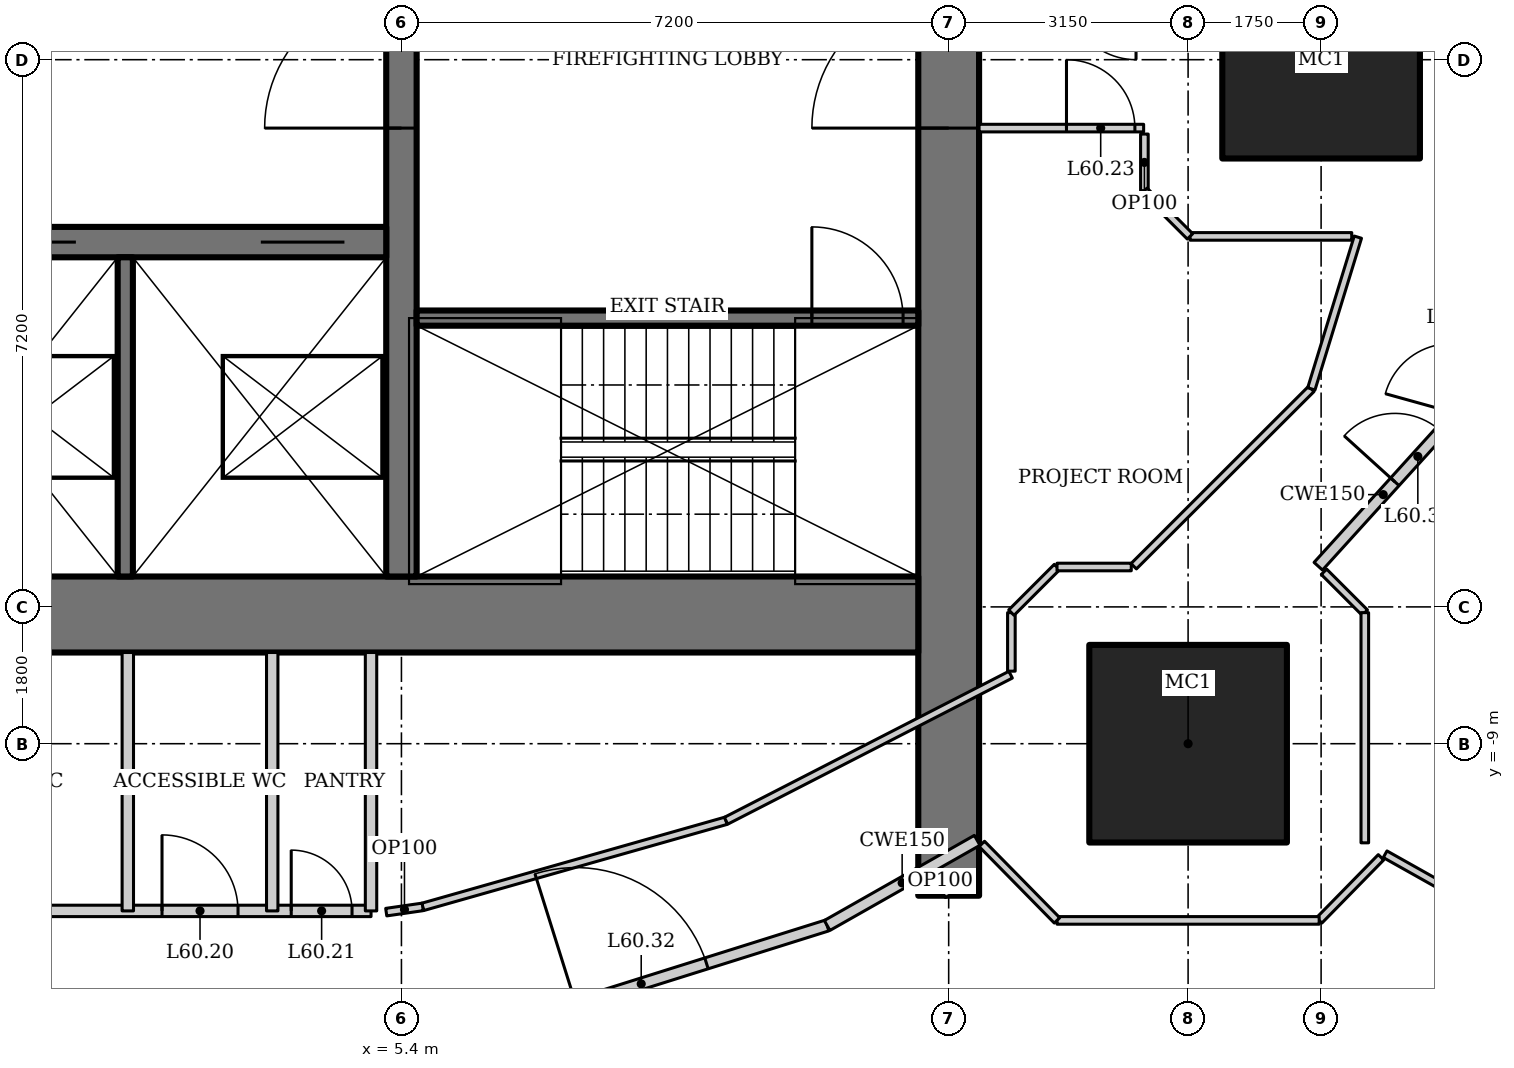
"""IFC4 building model, lengths in metres.
Left out: names, types, materials, properties, quantities, classifications, styles, units other than length and angle.
Written with IfcOpenShell. Run it as: python <this file> out.ifc"""

import sys

from ifc_helpers import new_model, si_unit, direction, frame, frame_2d, origin, origin_2d, place, context, subcontext, project, spatial, rectangle, hollow_rectangle, extrude, element, fill, save


model = new_model("IFC4")
c1 = context("Model", 3, precision=1e-05, world=origin(), true_north=direction((0.0, 1.0)))
c2 = subcontext(c1, "Body", "Model", "MODEL_VIEW")
j1 = project(units=[si_unit("LENGTHUNIT", "METRE"), si_unit("PLANEANGLEUNIT", "RADIAN")], contexts=[c1])
p1 = place(None, origin())
s1 = spatial("IfcSite", under=j1, at=p1, CompositionType="ELEMENT")
p2 = place(p1, origin())
s2 = spatial("IfcBuilding", under=s1, at=p2, CompositionType="ELEMENT")
p3 = place(p2, frame((0.0, 0.0, 257.8)))
s3 = spatial("IfcBuildingStorey", under=s2, at=p3, CompositionType="ELEMENT", Elevation=257.8)
for number, where, z_axis, x_axis in (
    (1, (17.5, 0.0, 0.0), (0.0, 0.0, 1.0), (1.0, 0.0, 0.0)),
    (2, (15.75, -9.0, 0.0), (0.0, 0.0, 1.0), (1.0, 0.0, 0.0)),
):
    element("IfcColumn", number, at=place(p3, frame(where, z_axis=z_axis, x_axis=x_axis)), inside=s3, PredefinedType="COLUMN", context=c2, shape_type="SweptSolid", body=[
        extrude(hollow_rectangle(XDim=2.6, YDim=2.6, WallThickness=0.13, at=origin_2d()), origin(), (0.0, 0.0, 1.0), 4.2),
    ])
p4 = place(p3, frame((12.6, -11.0, 0.0), z_axis=(0.0, 0.0, 1.0), x_axis=(0.0, 1.0, 0.0)))
e3 = element("IfcWall", 3, at=p4, inside=s3, PredefinedType="SHEAR", context=c2, shape_type="SweptSolid", body=[
    extrude(rectangle(XDim=22.0, YDim=0.8, at=frame_2d((11.0, 0.0))), origin(), (0.0, 0.0, 1.0), 4.2),
])
p5 = place(p4, frame((10.1, 0.0, 0.0)))
e4 = element("IfcOpeningElement", 4, at=p5, cuts=e3, PredefinedType="OPENING", context=c2, shape_type="SweptSolid", body=[
    extrude(rectangle(XDim=1.8, YDim=2.1, at=frame_2d((0.9, 1.05))), frame((0.0, 0.41, 0.0), z_axis=(0.0, -1.0, 0.0), x_axis=(1.0, 0.0, 0.0)), (0.0, 0.0, 1.0), 0.82),
])
p6 = place(p3, frame((-12.2, -7.3, 0.0), z_axis=(0.0, 0.0, 1.0), x_axis=(1.0, 0.0, 0.0)))
e5 = element("IfcWall", 5, at=p6, inside=s3, PredefinedType="SHEAR", context=c2, shape_type="SweptSolid", body=[
    extrude(rectangle(XDim=24.4, YDim=1.0, at=frame_2d((12.2, 0.0))), origin(), (0.0, 0.0, 1.0), 4.2),
])
p7 = place(p3, frame((5.4, -6.8, 0.0), z_axis=(0.0, 0.0, 1.0), x_axis=(0.0, 1.0, 0.0)))
e6 = element("IfcWall", 6, at=p7, inside=s3, PredefinedType="SHEAR", context=c2, shape_type="SweptSolid", body=[
    extrude(rectangle(XDim=14.6, YDim=0.4, at=frame_2d((7.3, 0.0))), origin(), (0.0, 0.0, 1.0), 4.2),
])
p8 = place(p7, frame((5.9, 0.0, 0.0)))
e7 = element("IfcOpeningElement", 7, at=p8, cuts=e6, PredefinedType="OPENING", context=c2, shape_type="SweptSolid", body=[
    extrude(rectangle(XDim=1.8, YDim=2.1, at=frame_2d((0.9, 1.05))), frame((0.0, 0.21, 0.0), z_axis=(0.0, -1.0, 0.0), x_axis=(1.0, 0.0, 0.0)), (0.0, 0.0, 1.0), 0.42),
])
p9 = place(p3, frame((-5.2, -2.4, 0.0), z_axis=(0.0, 0.0, 1.0), x_axis=(1.0, 0.0, 0.0)))
e8 = element("IfcWall", 8, at=p9, inside=s3, PredefinedType="SHEAR", context=c2, shape_type="SweptSolid", body=[
    extrude(rectangle(XDim=10.4, YDim=0.4, at=frame_2d((5.2, 0.0))), origin(), (0.0, 0.0, 1.0), 4.2),
])
p10 = place(p9, frame((1.683, 0.0, 0.0)))
e9 = element("IfcOpeningElement", 9, at=p10, cuts=e8, PredefinedType="OPENING", context=c2, shape_type="SweptSolid", body=[
    extrude(rectangle(XDim=1.1, YDim=2.2, at=frame_2d((0.55, 1.1))), frame((0.0, 0.21, 0.0), z_axis=(0.0, -1.0, 0.0), x_axis=(1.0, 0.0, 0.0)), (0.0, 0.0, 1.0), 0.42),
])
p11 = place(p9, frame((5.217, 0.0, 0.0)))
e10 = element("IfcOpeningElement", 10, at=p11, cuts=e8, PredefinedType="OPENING", context=c2, shape_type="SweptSolid", body=[
    extrude(rectangle(XDim=1.1, YDim=2.2, at=frame_2d((0.55, 1.1))), frame((0.0, 0.21, 0.0), z_axis=(0.0, -1.0, 0.0), x_axis=(1.0, 0.0, 0.0)), (0.0, 0.0, 1.0), 0.42),
])
p12 = place(p9, frame((8.75, 0.0, 0.0)))
e11 = element("IfcOpeningElement", 11, at=p12, cuts=e8, PredefinedType="OPENING", context=c2, shape_type="SweptSolid", body=[
    extrude(rectangle(XDim=1.1, YDim=2.2, at=frame_2d((0.55, 1.1))), frame((0.0, 0.21, 0.0), z_axis=(0.0, -1.0, 0.0), x_axis=(1.0, 0.0, 0.0)), (0.0, 0.0, 1.0), 0.42),
])
p13 = place(p3, frame((1.767, -2.6, 0.0), z_axis=(0.0, 0.0, 1.0), x_axis=(0.0, -1.0, 0.0)))
e12 = element("IfcWall", 12, at=p13, inside=s3, PredefinedType="SOLIDWALL", context=c2, shape_type="SweptSolid", body=[
    extrude(rectangle(XDim=4.2, YDim=0.2, at=frame_2d((2.1, 0.0))), origin(), (0.0, 0.0, 1.0), 4.2),
])
p14 = place(p3, frame((5.6, -3.4, 0.0), z_axis=(0.0, 0.0, 1.0), x_axis=(1.0, 0.0, 0.0)))
e13 = element("IfcWall", 13, at=p14, inside=s3, PredefinedType="SHEAR", context=c2, shape_type="SweptSolid", body=[
    extrude(rectangle(XDim=6.6, YDim=0.2, at=frame_2d((3.3, 0.0))), origin(), (0.0, 0.0, 1.0), 4.2),
])
p15 = place(p14, frame((5.2, 0.0, 0.0)))
e14 = element("IfcOpeningElement", 14, at=p15, cuts=e13, PredefinedType="OPENING", context=c2, shape_type="SweptSolid", body=[
    extrude(rectangle(XDim=1.2, YDim=2.1, at=frame_2d((0.6, 1.05))), frame((0.0, 0.11, 0.0), z_axis=(0.0, -1.0, 0.0), x_axis=(1.0, 0.0, 0.0)), (0.0, 0.0, 1.0), 0.22),
])
p16 = place(p3, frame((6.521, -12.799, 0.0), z_axis=(0.0, 0.0, 1.0), x_axis=(0.954031103669, 0.299707612903, 0.0)))
e15 = element("IfcWall", 15, at=p16, inside=s3, PredefinedType="PARTITIONING", context=c2, shape_type="SweptSolid", body=[
    extrude(rectangle(XDim=4.695, YDim=0.15, at=frame_2d((2.348, 0.0))), origin(), (0.0, 0.0, 1.0), 4.05),
])
p17 = place(p16, frame((1.231, 0.0, 0.0)))
e16 = element("IfcOpeningElement", 16, at=p17, cuts=e15, PredefinedType="OPENING", context=c2, shape_type="SweptSolid", body=[
    extrude(rectangle(XDim=1.8, YDim=2.1, at=frame_2d((0.9, 1.05))), frame((0.0, 0.085, 0.0), z_axis=(0.0, -1.0, 0.0), x_axis=(1.0, 0.0, 0.0)), (0.0, 0.0, 1.0), 0.17),
])
p18 = place(p3, frame((-5.0, -11.2, 0.0), z_axis=(0.0, 0.0, 1.0), x_axis=(1.0, 0.0, 0.0)))
e17 = element("IfcWall", 17, at=p18, inside=s3, PredefinedType="SOLIDWALL", context=c2, shape_type="SweptSolid", body=[
    extrude(rectangle(XDim=10.0, YDim=0.15, at=frame_2d((5.0, 0.0))), origin(), (0.0, 0.0, 1.0), 4.05),
])
p19 = place(p18, frame((1.25, 0.0, 0.0)))
e18 = element("IfcOpeningElement", 18, at=p19, cuts=e17, PredefinedType="OPENING", context=c2, shape_type="SweptSolid", body=[
    extrude(rectangle(XDim=0.9, YDim=2.1, at=frame_2d((0.45, 1.05))), frame((0.0, 0.085, 0.0), z_axis=(0.0, -1.0, 0.0), x_axis=(1.0, 0.0, 0.0)), (0.0, 0.0, 1.0), 0.17),
])
p20 = place(p18, frame((4.65, 0.0, 0.0)))
e19 = element("IfcOpeningElement", 19, at=p20, cuts=e17, PredefinedType="OPENING", context=c2, shape_type="SweptSolid", body=[
    extrude(rectangle(XDim=0.9, YDim=2.1, at=frame_2d((0.45, 1.05))), frame((0.0, 0.085, 0.0), z_axis=(0.0, -1.0, 0.0), x_axis=(1.0, 0.0, 0.0)), (0.0, 0.0, 1.0), 0.17),
])
p21 = place(p18, frame((7.25, 0.0, 0.0)))
e20 = element("IfcOpeningElement", 20, at=p21, cuts=e17, PredefinedType="OPENING", context=c2, shape_type="SweptSolid", body=[
    extrude(rectangle(XDim=1.0, YDim=2.1, at=frame_2d((0.5, 1.05))), frame((0.0, 0.085, 0.0), z_axis=(0.0, -1.0, 0.0), x_axis=(1.0, 0.0, 0.0)), (0.0, 0.0, 1.0), 0.17),
])
p22 = place(p18, frame((8.95, 0.0, 0.0)))
e21 = element("IfcOpeningElement", 21, at=p22, cuts=e17, PredefinedType="OPENING", context=c2, shape_type="SweptSolid", body=[
    extrude(rectangle(XDim=0.8, YDim=2.1, at=frame_2d((0.4, 1.05))), frame((0.0, 0.085, 0.0), z_axis=(0.0, -1.0, 0.0), x_axis=(1.0, 0.0, 0.0)), (0.0, 0.0, 1.0), 0.17),
])
p23 = place(p3, frame((5.0, -7.8, 0.0), z_axis=(0.0, 0.0, 1.0), x_axis=(0.0, -1.0, 0.0)))
e22 = element("IfcWall", 22, at=p23, inside=s3, PredefinedType="SOLIDWALL", context=c2, shape_type="SweptSolid", body=[
    extrude(rectangle(XDim=3.4, YDim=0.15, at=frame_2d((1.7, 0.0))), origin(), (0.0, 0.0, 1.0), 4.05),
])
p24 = place(p3, frame((1.8, -7.8, 0.0), z_axis=(0.0, 0.0, 1.0), x_axis=(0.0, -1.0, 0.0)))
e23 = element("IfcWall", 23, at=p24, inside=s3, PredefinedType="SOLIDWALL", context=c2, shape_type="SweptSolid", body=[
    extrude(rectangle(XDim=3.4, YDim=0.15, at=frame_2d((1.7, 0.0))), origin(), (0.0, 0.0, 1.0), 3.293),
])
p25 = place(p3, frame((3.7, -7.8, 0.0), z_axis=(0.0, 0.0, 1.0), x_axis=(0.0, -1.0, 0.0)))
e24 = element("IfcWall", 24, at=p25, inside=s3, PredefinedType="SOLIDWALL", context=c2, shape_type="SweptSolid", body=[
    extrude(rectangle(XDim=3.4, YDim=0.15, at=frame_2d((1.7, 0.0))), origin(), (0.0, 0.0, 1.0), 4.05),
])
p26 = place(p3, frame((9.67, -10.014, 0.0), z_axis=(0.0, 0.0, 1.0), x_axis=(-0.961973498971, -0.273142796496, 0.0)))
e25 = element("IfcWall", 25, at=p26, inside=s3, PredefinedType="PARTITIONING", context=c2, shape_type="SweptSolid", body=[
    extrude(rectangle(XDim=4.148, YDim=0.1, at=frame_2d((2.074, 0.0))), origin(), (0.0, 0.0, 1.0), 4.05),
])
p27 = place(p3, frame((5.68, -11.147, 0.0), z_axis=(0.0, 0.0, 1.0), x_axis=(-0.989797891768, -0.142478536811, 0.0)))
e26 = element("IfcWall", 26, at=p27, inside=s3, PredefinedType="PARTITIONING", context=c2, shape_type="SweptSolid", body=[
    extrude(rectangle(XDim=0.485, YDim=0.1, at=frame_2d((0.242, 0.0))), origin(), (0.0, 0.0, 1.0), 4.05),
])
p28 = place(p3, frame((12.6, -11.0, 0.0), z_axis=(0.0, 0.0, 1.0), x_axis=(-0.493794495037, 0.869578631678, 0.0)))
e27 = element("IfcWall", 27, at=p28, inside=s3, PredefinedType="PARTITIONING", context=c2, shape_type="SweptSolid", body=[
    extrude(rectangle(XDim=0.449, YDim=0.1, at=frame_2d((0.225, 0.0))), origin(), (0.0, 0.0, 1.0), 4.05),
])
p29 = place(p3, frame((21.358, -12.15, 0.0), z_axis=(0.0, 0.0, 1.0), x_axis=(-0.871730019583, 0.489986502832, 0.0)))
e28 = element("IfcWall", 28, at=p29, inside=s3, PredefinedType="PARTITIONING", context=c2, shape_type="SweptSolid", body=[
    extrude(rectangle(XDim=3.46, YDim=0.1, at=frame_2d((1.73, 0.0))), origin(), (0.0, 0.0, 1.0), 3.522),
])
p30 = place(p3, frame((11.001, -11.392, 0.0), z_axis=(0.0, 0.0, 1.0), x_axis=(0.869722107117, 0.493541747366, 0.0)))
e29 = element("IfcWall", 29, at=p30, inside=s3, PredefinedType="PARTITIONING", context=c2, shape_type="SweptSolid", body=[
    extrude(rectangle(XDim=2.27, YDim=0.15, at=frame_2d((1.135, 0.0))), origin(), (0.0, 0.0, 1.0), 4.05),
])
p31 = place(p3, frame((17.463, -6.665, 0.0), z_axis=(0.0, 0.0, 1.0), x_axis=(0.671721890643, 0.74080341632, 0.0)))
e30 = element("IfcWall", 30, at=p31, inside=s3, PredefinedType="PARTITIONING", context=c2, shape_type="SweptSolid", body=[
    extrude(rectangle(XDim=2.544, YDim=0.15, at=frame_2d((1.272, 0.0))), origin(), (0.0, 0.0, 1.0), 4.05),
])
p32 = place(p31, frame((1.5, 0.0, 0.0)))
e31 = element("IfcOpeningElement", 31, at=p32, cuts=e30, PredefinedType="OPENING", context=c2, shape_type="SweptSolid", body=[
    extrude(rectangle(XDim=0.9, YDim=2.1, at=frame_2d((0.45, 1.05))), frame((0.0, 0.085, 0.0), z_axis=(0.0, -1.0, 0.0), x_axis=(1.0, 0.0, 0.0)), (0.0, 0.0, 1.0), 0.17),
])
p33 = place(p3, frame((17.372, -4.331, 0.0), z_axis=(0.0, 0.0, 1.0), x_axis=(-0.707587114823, -0.70662612104, 0.0)))
e32 = element("IfcWall", 32, at=p33, inside=s3, PredefinedType="PARTITIONING", context=c2, shape_type="SweptSolid", body=[
    extrude(rectangle(XDim=3.303, YDim=0.1, at=frame_2d((1.651, 0.0))), origin(), (0.0, 0.0, 1.0), 4.05),
])
p34 = place(p3, frame((13.415, -8.092, 0.0), z_axis=(0.0, 0.0, 1.0), x_axis=(-0.889620520549, -0.45670048108, 0.0)))
e33 = element("IfcWall", 33, at=p34, inside=s3, PredefinedType="PARTITIONING", context=c2, shape_type="SweptSolid", body=[
    extrude(rectangle(XDim=4.209, YDim=0.1, at=frame_2d((2.104, 0.0))), origin(), (0.0, 0.0, 1.0), 4.05),
])
p35 = place(p3, frame((13.425, -8.046, 0.0), z_axis=(0.0, 0.0, 1.0), x_axis=(0.0, 1.0, 0.0)))
e34 = element("IfcWall", 34, at=p35, inside=s3, PredefinedType="PARTITIONING", context=c2, shape_type="SweptSolid", body=[
    extrude(rectangle(XDim=0.77, YDim=0.1, at=frame_2d((0.385, 0.0))), origin(), (0.0, 0.0, 1.0), 4.05),
])
p36 = place(p3, frame((13.425, -7.275, 0.0), z_axis=(0.0, 0.0, 1.0), x_axis=(0.707106781187, 0.707106781187, 0.0)))
e35 = element("IfcWall", 35, at=p36, inside=s3, PredefinedType="PARTITIONING", context=c2, shape_type="SweptSolid", body=[
    extrude(rectangle(XDim=0.849, YDim=0.1, at=frame_2d((0.425, 0.0))), origin(), (0.0, 0.0, 1.0), 4.05),
])
p37 = place(p3, frame((14.025, -6.675, 0.0), z_axis=(0.0, 0.0, 1.0), x_axis=(1.0, 0.0, 0.0)))
e36 = element("IfcWall", 36, at=p37, inside=s3, PredefinedType="PARTITIONING", context=c2, shape_type="SweptSolid", body=[
    extrude(rectangle(XDim=0.977, YDim=0.1, at=frame_2d((0.488, 0.0))), origin(), (0.0, 0.0, 1.0), 4.05),
])
p38 = place(p3, frame((18.288, -10.495, 0.0), z_axis=(0.0, 0.0, 1.0), x_axis=(-0.699823580681, -0.714315725659, 0.0)))
e37 = element("IfcWall", 37, at=p38, inside=s3, PredefinedType="PARTITIONING", context=c2, shape_type="SweptSolid", body=[
    extrude(rectangle(XDim=1.162, YDim=0.1, at=frame_2d((0.581, 0.0))), origin(), (0.0, 0.0, 1.0), 4.05),
])
p39 = place(p3, frame((17.475, -11.325, 0.0), z_axis=(0.0, 0.0, 1.0), x_axis=(-1.0, 0.0, 0.0)))
e38 = element("IfcWall", 38, at=p39, inside=s3, PredefinedType="PARTITIONING", context=c2, shape_type="SweptSolid", body=[
    extrude(rectangle(XDim=3.449, YDim=0.1, at=frame_2d((1.725, 0.0))), origin(), (0.0, 0.0, 1.0), 4.05),
])
p40 = place(p3, frame((14.025, -11.325, 0.0), z_axis=(0.0, 0.0, 1.0), x_axis=(-0.701113567316, 0.713049623606, 0.0)))
e39 = element("IfcWall", 39, at=p40, inside=s3, PredefinedType="PARTITIONING", context=c2, shape_type="SweptSolid", body=[
    extrude(rectangle(XDim=1.411, YDim=0.1, at=frame_2d((0.706, 0.0))), origin(), (0.0, 0.0, 1.0), 4.05),
])
p41 = place(p3, frame((17.538, -6.738, 0.0), z_axis=(0.0, 0.0, 1.0), x_axis=(0.707106781187, -0.707106781187, 0.0)))
e40 = element("IfcWall", 40, at=p41, inside=s3, PredefinedType="PARTITIONING", context=c2, shape_type="SweptSolid", body=[
    extrude(rectangle(XDim=0.76, YDim=0.1, at=frame_2d((0.38, 0.0))), origin(), (0.0, 0.0, 1.0), 4.05),
])
p42 = place(p3, frame((18.075, -7.275, 0.0), z_axis=(0.0, 0.0, 1.0), x_axis=(0.0, -1.0, 0.0)))
e41 = element("IfcWall", 41, at=p42, inside=s3, PredefinedType="PARTITIONING", context=c2, shape_type="SweptSolid", body=[
    extrude(rectangle(XDim=3.029, YDim=0.1, at=frame_2d((1.514, 0.0))), origin(), (0.0, 0.0, 1.0), 3.6),
])
p43 = place(p3, frame((13.0, -0.9, 0.0), z_axis=(0.0, 0.0, 1.0), x_axis=(1.0, 0.0, 0.0)))
e42 = element("IfcWall", 42, at=p43, inside=s3, PredefinedType="PARTITIONING", context=c2, shape_type="SweptSolid", body=[
    extrude(rectangle(XDim=2.165, YDim=0.1, at=frame_2d((1.083, 0.0))), origin(), (0.0, 0.0, 1.0), 4.05),
])
p44 = place(p43, frame((1.15, 0.0, 0.0)))
e43 = element("IfcOpeningElement", 43, at=p44, cuts=e42, PredefinedType="OPENING", context=c2, shape_type="SweptSolid", body=[
    extrude(rectangle(XDim=0.9, YDim=2.1, at=frame_2d((0.45, 1.05))), frame((0.0, 0.06, 0.0), z_axis=(0.0, -1.0, 0.0), x_axis=(1.0, 0.0, 0.0)), (0.0, 0.0, 1.0), 0.12),
])
p45 = place(p3, frame((17.984, -2.335, 0.0), z_axis=(0.0, 0.0, 1.0), x_axis=(-0.293231279211, -0.956041535129, 0.0)))
e44 = element("IfcWall", 44, at=p45, inside=s3, PredefinedType="PARTITIONING", context=c2, shape_type="SweptSolid", body=[
    extrude(rectangle(XDim=2.088, YDim=0.1, at=frame_2d((1.044, 0.0))), origin(), (0.0, 0.0, 1.0), 4.05),
])
p46 = place(p3, frame((15.175, -1.725, 0.0), z_axis=(0.0, 0.0, 1.0), x_axis=(0.0, 1.0, 0.0)))
e45 = element("IfcWall", 45, at=p46, inside=s3, PredefinedType="PARTITIONING", context=c2, shape_type="SweptSolid", body=[
    extrude(rectangle(XDim=0.746, YDim=0.1, at=frame_2d((0.373, 0.0))), origin(), (0.0, 0.0, 1.0), 4.05),
])
p47 = place(p3, frame((17.903, -2.325, 0.0), z_axis=(0.0, 0.0, 1.0), x_axis=(-1.0, 0.0, 0.0)))
e46 = element("IfcWall", 46, at=p47, inside=s3, PredefinedType="PARTITIONING", context=c2, shape_type="SweptSolid", body=[
    extrude(rectangle(XDim=2.128, YDim=0.1, at=frame_2d((1.064, 0.0))), origin(), (0.0, 0.0, 1.0), 4.05),
])
p48 = place(p3, frame((15.775, -2.325, 0.0), z_axis=(0.0, 0.0, 1.0), x_axis=(-0.707106781187, 0.707106781187, 0.0)))
e47 = element("IfcWall", 47, at=p48, inside=s3, PredefinedType="PARTITIONING", context=c2, shape_type="SweptSolid", body=[
    extrude(rectangle(XDim=0.849, YDim=0.1, at=frame_2d((0.425, 0.0))), origin(), (0.0, 0.0, 1.0), 4.05),
])
p49 = place(p8, origin())
e48 = element("IfcDoor", 48, at=p49, inside=s3, OperationType="DOUBLE_DOOR_DOUBLE_SWING", PredefinedType="DOOR", context=c2, shape_type="SweptSolid", body=[
    extrude(rectangle(XDim=1.8, YDim=2.1, at=frame_2d((0.9, 1.05))), frame((0.0, 0.025, 0.0), z_axis=(0.0, -1.0, 0.0), x_axis=(1.0, 0.0, 0.0)), (0.0, 0.0, 1.0), 0.05),
])
fill(e7, e48)
p50 = place(p15, origin())
e49 = element("IfcDoor", 49, at=p50, inside=s3, OperationType="SINGLE_SWING_RIGHT", PredefinedType="DOOR", context=c2, shape_type="SweptSolid", body=[
    extrude(rectangle(XDim=1.2, YDim=2.1, at=frame_2d((0.6, 1.05))), frame((0.0, 0.025, 0.0), z_axis=(0.0, -1.0, 0.0), x_axis=(1.0, 0.0, 0.0)), (0.0, 0.0, 1.0), 0.05),
])
fill(e14, e49)
p51 = place(p5, origin())
e50 = element("IfcDoor", 50, at=p51, inside=s3, OperationType="DOUBLE_DOOR_DOUBLE_SWING", PredefinedType="DOOR", context=c2, shape_type="SweptSolid", body=[
    extrude(rectangle(XDim=1.8, YDim=2.1, at=frame_2d((0.9, 1.05))), frame((0.0, 0.025, 0.0), z_axis=(0.0, -1.0, 0.0), x_axis=(1.0, 0.0, 0.0)), (0.0, 0.0, 1.0), 0.05),
])
fill(e4, e50)
p52 = place(p11, origin())
e51 = element("IfcDoor", 51, at=p52, inside=s3, OperationType="DOUBLE_DOOR_SLIDING", PredefinedType="DOOR", context=c2, shape_type="SweptSolid", body=[
    extrude(rectangle(XDim=1.1, YDim=2.2, at=frame_2d((0.55, 1.1))), frame((0.0, 0.025, 0.0), z_axis=(0.0, -1.0, 0.0), x_axis=(1.0, 0.0, 0.0)), (0.0, 0.0, 1.0), 0.05),
])
fill(e10, e51)
p53 = place(p12, origin())
e52 = element("IfcDoor", 52, at=p53, inside=s3, OperationType="DOUBLE_DOOR_SLIDING", PredefinedType="DOOR", context=c2, shape_type="SweptSolid", body=[
    extrude(rectangle(XDim=1.1, YDim=2.2, at=frame_2d((0.55, 1.1))), frame((0.0, 0.025, 0.0), z_axis=(0.0, -1.0, 0.0), x_axis=(1.0, 0.0, 0.0)), (0.0, 0.0, 1.0), 0.05),
])
fill(e11, e52)
p54 = place(p21, origin())
e53 = element("IfcDoor", 53, at=p54, inside=s3, OperationType="SINGLE_SWING_LEFT", PredefinedType="DOOR", context=c2, shape_type="SweptSolid", body=[
    extrude(rectangle(XDim=1.0, YDim=2.1, at=frame_2d((0.5, 1.05))), frame((0.0, 0.025, 0.0), z_axis=(0.0, -1.0, 0.0), x_axis=(1.0, 0.0, 0.0)), (0.0, 0.0, 1.0), 0.05),
])
fill(e20, e53)
p55 = place(p22, origin())
e54 = element("IfcDoor", 54, at=p55, inside=s3, OperationType="SINGLE_SWING_LEFT", PredefinedType="DOOR", context=c2, shape_type="SweptSolid", body=[
    extrude(rectangle(XDim=0.8, YDim=2.1, at=frame_2d((0.4, 1.05))), frame((0.0, 0.025, 0.0), z_axis=(0.0, -1.0, 0.0), x_axis=(1.0, 0.0, 0.0)), (0.0, 0.0, 1.0), 0.05),
])
fill(e21, e54)
p56 = place(p44, origin())
e55 = element("IfcDoor", 55, at=p56, inside=s3, OperationType="SINGLE_SWING_LEFT", PredefinedType="DOOR", context=c2, shape_type="SweptSolid", body=[
    extrude(rectangle(XDim=0.9, YDim=2.1, at=frame_2d((0.45, 1.05))), frame((0.0, 0.025, 0.0), z_axis=(0.0, -1.0, 0.0), x_axis=(1.0, 0.0, 0.0)), (0.0, 0.0, 1.0), 0.05),
])
fill(e43, e55)
p57 = place(p17, origin())
e56 = element("IfcDoor", 56, at=p57, inside=s3, OperationType="DOUBLE_DOOR_DOUBLE_SWING", PredefinedType="DOOR", context=c2, shape_type="SweptSolid", body=[
    extrude(rectangle(XDim=1.8, YDim=2.1, at=frame_2d((0.9, 1.05))), frame((0.0, 0.025, 0.0), z_axis=(0.0, -1.0, 0.0), x_axis=(1.0, 0.0, 0.0)), (0.0, 0.0, 1.0), 0.05),
])
fill(e16, e56)
p58 = place(p32, origin())
e57 = element("IfcDoor", 57, at=p58, inside=s3, OperationType="SINGLE_SWING_LEFT", PredefinedType="DOOR", context=c2, shape_type="SweptSolid", body=[
    extrude(rectangle(XDim=0.9, YDim=2.1, at=frame_2d((0.45, 1.05))), frame((0.0, 0.025, 0.0), z_axis=(0.0, -1.0, 0.0), x_axis=(1.0, 0.0, 0.0)), (0.0, 0.0, 1.0), 0.05),
])
fill(e31, e57)
save(model, sys.argv[1])
